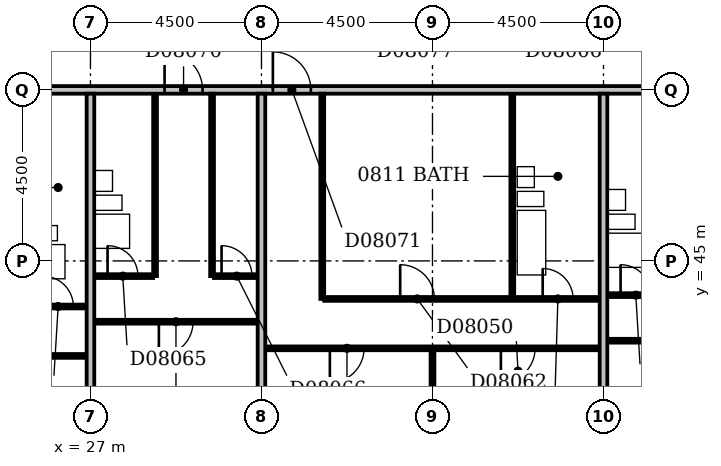
"""IFC4 building model, lengths in metres.
Left out: names, types, materials, properties, quantities, classifications, styles, units other than length and angle.
Written with IfcOpenShell. Run it as: python <this file> out.ifc"""

import sys

from ifc_helpers import new_model, si_unit, direction, frame, frame_2d, origin, place, context, subcontext, project, spatial, rectangle, extrude, element, fill, save


model = new_model("IFC4")
c1 = context("Model", 3, precision=1e-05, world=origin(), true_north=direction((0.0, 1.0)))
c2 = subcontext(c1, "Body", "Model", "MODEL_VIEW")
j1 = project(units=[si_unit("LENGTHUNIT", "METRE"), si_unit("PLANEANGLEUNIT", "RADIAN")], contexts=[c1])
p1 = place(None, origin())
s1 = spatial("IfcSite", under=j1, at=p1, CompositionType="ELEMENT")
p2 = place(p1, origin())
s2 = spatial("IfcBuilding", under=s1, at=p2, CompositionType="ELEMENT")
p3 = place(p2, frame((0.0, 0.0, 39.8)))
s3 = spatial("IfcBuildingStorey", under=s2, at=p3, CompositionType="ELEMENT", Elevation=39.8)
p4 = place(p3, frame((27.0, 36.6, 0.0), z_axis=(0.0, 0.0, 1.0), x_axis=(0.0, 1.0, 0.0)))
e1 = element("IfcWall", 1, at=p4, inside=s3, PredefinedType="PARTITIONING", context=c2, shape_type="SweptSolid", body=[
    extrude(rectangle(XDim=12.8, YDim=0.2, at=frame_2d((6.4, 0.0))), origin(), (0.0, 0.0, 1.0), 2.6),
])
p5 = place(p3, frame((31.5, 36.6, 0.0), z_axis=(0.0, 0.0, 1.0), x_axis=(0.0, 1.0, 0.0)))
e2 = element("IfcWall", 2, at=p5, inside=s3, PredefinedType="PARTITIONING", context=c2, shape_type="SweptSolid", body=[
    extrude(rectangle(XDim=12.8, YDim=0.2, at=frame_2d((6.4, 0.0))), origin(), (0.0, 0.0, 1.0), 3.3),
])
p6 = place(p3, frame((36.0, 36.6, 0.0), z_axis=(0.0, 0.0, 1.0), x_axis=(0.0, 1.0, 0.0)))
e3 = element("IfcWall", 3, at=p6, inside=s3, PredefinedType="PARTITIONING", context=c2, shape_type="SweptSolid", body=[
    extrude(rectangle(XDim=6.05, YDim=0.1, at=frame_2d((3.025, 0.0))), origin(), (0.0, 0.0, 1.0), 2.4),
])
p7 = place(p3, frame((40.5, 36.6, 0.0), z_axis=(0.0, 0.0, 1.0), x_axis=(0.0, 1.0, 0.0)))
e4 = element("IfcWall", 4, at=p7, inside=s3, PredefinedType="PARTITIONING", context=c2, shape_type="SweptSolid", body=[
    extrude(rectangle(XDim=12.8, YDim=0.2, at=frame_2d((6.4, 0.0))), origin(), (0.0, 0.0, 1.0), 3.3),
])
p8 = place(p3, frame((22.6, 42.5, 0.0), z_axis=(0.0, 0.0, 1.0), x_axis=(1.0, 0.0, 0.0)))
e5 = element("IfcWall", 5, at=p8, inside=s3, PredefinedType="PARTITIONING", context=c2, shape_type="SweptSolid", body=[
    extrude(rectangle(XDim=4.3, YDim=0.1, at=frame_2d((2.15, 0.0))), origin(), (0.0, 0.0, 1.0), 3.3),
])
p9 = place(p8, frame((1.7, 0.0, 0.0)))
e6 = element("IfcOpeningElement", 6, at=p9, cuts=e5, PredefinedType="OPENING", context=c2, shape_type="SweptSolid", body=[
    extrude(rectangle(XDim=0.9, YDim=2.1, at=frame_2d((0.45, 1.05))), frame((0.0, 0.062, 0.0), z_axis=(0.0, -1.0, 0.0), x_axis=(1.0, 0.0, 0.0)), (0.0, 0.0, 1.0), 0.124),
])
p10 = place(p3, frame((31.6, 42.7, 0.0), z_axis=(0.0, 0.0, 1.0), x_axis=(1.0, 0.0, 0.0)))
e7 = element("IfcWall", 7, at=p10, inside=s3, PredefinedType="PARTITIONING", context=c2, shape_type="SweptSolid", body=[
    extrude(rectangle(XDim=8.8, YDim=0.1, at=frame_2d((4.4, 0.0))), origin(), (0.0, 0.0, 1.0), 3.3),
])
p11 = place(p10, frame((1.7, 0.0, 0.0)))
e8 = element("IfcOpeningElement", 8, at=p11, cuts=e7, PredefinedType="OPENING", context=c2, shape_type="SweptSolid", body=[
    extrude(rectangle(XDim=0.9, YDim=2.1, at=frame_2d((0.45, 1.05))), frame((0.0, 0.062, 0.0), z_axis=(0.0, -1.0, 0.0), x_axis=(1.0, 0.0, 0.0)), (0.0, 0.0, 1.0), 0.124),
])
p12 = place(p10, frame((6.2, 0.0, 0.0)))
e9 = element("IfcOpeningElement", 9, at=p12, cuts=e7, PredefinedType="OPENING", context=c2, shape_type="SweptSolid", body=[
    extrude(rectangle(XDim=0.9, YDim=2.1, at=frame_2d((0.45, 1.05))), frame((0.0, 0.062, 0.0), z_axis=(0.0, -1.0, 0.0), x_axis=(1.0, 0.0, 0.0)), (0.0, 0.0, 1.0), 0.124),
])
p13 = place(p3, frame((40.6, 42.9, 0.0), z_axis=(0.0, 0.0, 1.0), x_axis=(1.0, 0.0, 0.0)))
e10 = element("IfcWall", 10, at=p13, inside=s3, PredefinedType="PARTITIONING", context=c2, shape_type="SweptSolid", body=[
    extrude(rectangle(XDim=4.3, YDim=0.1, at=frame_2d((2.15, 0.0))), origin(), (0.0, 0.0, 1.0), 3.3),
])
p14 = place(p13, frame((1.7, 0.0, 0.0)))
e11 = element("IfcOpeningElement", 11, at=p14, cuts=e10, PredefinedType="OPENING", context=c2, shape_type="SweptSolid", body=[
    extrude(rectangle(XDim=0.9, YDim=2.1, at=frame_2d((0.45, 1.05))), frame((0.0, 0.062, 0.0), z_axis=(0.0, -1.0, 0.0), x_axis=(1.0, 0.0, 0.0)), (0.0, 0.0, 1.0), 0.124),
])
p15 = place(p3, frame((27.1, 43.4, 0.0), z_axis=(0.0, 0.0, 1.0), x_axis=(1.0, 0.0, 0.0)))
e12 = element("IfcWall", 12, at=p15, inside=s3, PredefinedType="PARTITIONING", context=c2, shape_type="SweptSolid", body=[
    extrude(rectangle(XDim=4.3, YDim=0.1, at=frame_2d((2.15, 0.0))), origin(), (0.0, 0.0, 1.0), 3.3),
])
p16 = place(p15, frame((1.7, 0.0, 0.0)))
e13 = element("IfcOpeningElement", 13, at=p16, cuts=e12, PredefinedType="OPENING", context=c2, shape_type="SweptSolid", body=[
    extrude(rectangle(XDim=0.9, YDim=2.1, at=frame_2d((0.45, 1.05))), frame((0.0, 0.062, 0.0), z_axis=(0.0, -1.0, 0.0), x_axis=(1.0, 0.0, 0.0)), (0.0, 0.0, 1.0), 0.124),
])
p17 = place(p3, frame((25.35, 43.8, 0.0), z_axis=(0.0, 0.0, 1.0), x_axis=(1.0, 0.0, 0.0)))
e14 = element("IfcWall", 14, at=p17, inside=s3, PredefinedType="PARTITIONING", context=c2, shape_type="SweptSolid", body=[
    extrude(rectangle(XDim=1.55, YDim=0.1, at=frame_2d((0.775, 0.0))), origin(), (0.0, 0.0, 1.0), 3.3),
])
p18 = place(p17, frame((0.4, 0.0, 0.0)))
e15 = element("IfcOpeningElement", 15, at=p18, cuts=e14, PredefinedType="OPENING", context=c2, shape_type="SweptSolid", body=[
    extrude(rectangle(XDim=0.8, YDim=2.1, at=frame_2d((0.4, 1.05))), frame((0.0, 0.062, 0.0), z_axis=(0.0, -1.0, 0.0), x_axis=(1.0, 0.0, 0.0)), (0.0, 0.0, 1.0), 0.124),
])
p19 = place(p3, frame((33.1, 44.0, 0.0), z_axis=(0.0, 0.0, 1.0), x_axis=(0.0, 1.0, 0.0)))
e16 = element("IfcWall", 16, at=p19, inside=s3, PredefinedType="PARTITIONING", context=c2, shape_type="SweptSolid", body=[
    extrude(rectangle(XDim=5.4, YDim=0.1, at=frame_2d((2.7, 0.0))), origin(), (0.0, 0.0, 1.0), 3.3),
])
p20 = place(p3, frame((33.15, 44.0, 0.0), z_axis=(0.0, 0.0, 1.0), x_axis=(1.0, 0.0, 0.0)))
e17 = element("IfcWall", 17, at=p20, inside=s3, PredefinedType="PARTITIONING", context=c2, shape_type="SweptSolid", body=[
    extrude(rectangle(XDim=7.25, YDim=0.1, at=frame_2d((3.625, 0.0))), origin(), (0.0, 0.0, 1.0), 3.3),
])
p21 = place(p20, frame((5.75, 0.0, 0.0)))
e18 = element("IfcOpeningElement", 18, at=p21, cuts=e17, PredefinedType="OPENING", context=c2, shape_type="SweptSolid", body=[
    extrude(rectangle(XDim=0.8, YDim=2.1, at=frame_2d((0.4, 1.05))), frame((0.0, 0.062, 0.0), z_axis=(0.0, -1.0, 0.0), x_axis=(1.0, 0.0, 0.0)), (0.0, 0.0, 1.0), 0.124),
])
p22 = place(p20, frame((2.0, 0.0, 0.0)))
e19 = element("IfcOpeningElement", 19, at=p22, cuts=e17, PredefinedType="OPENING", context=c2, shape_type="SweptSolid", body=[
    extrude(rectangle(XDim=0.9, YDim=2.1, at=frame_2d((0.45, 1.05))), frame((0.0, 0.062, 0.0), z_axis=(0.0, -1.0, 0.0), x_axis=(1.0, 0.0, 0.0)), (0.0, 0.0, 1.0), 0.124),
])
p23 = place(p3, frame((38.1, 44.05, 0.0), z_axis=(0.0, 0.0, 1.0), x_axis=(0.0, 1.0, 0.0)))
e20 = element("IfcWall", 20, at=p23, inside=s3, PredefinedType="PLUMBINGWALL", context=c2, shape_type="SweptSolid", body=[
    extrude(rectangle(XDim=5.35, YDim=0.1, at=frame_2d((2.675, 0.0))), origin(), (0.0, 0.0, 1.0), 3.3),
])
p24 = place(p3, frame((40.6, 44.1, 0.0), z_axis=(0.0, 0.0, 1.0), x_axis=(1.0, 0.0, 0.0)))
e21 = element("IfcWall", 21, at=p24, inside=s3, PredefinedType="PARTITIONING", context=c2, shape_type="SweptSolid", body=[
    extrude(rectangle(XDim=1.55, YDim=0.1, at=frame_2d((0.775, 0.0))), origin(), (0.0, 0.0, 1.0), 3.3),
])
p25 = place(p24, frame((0.35, 0.0, 0.0)))
e22 = element("IfcOpeningElement", 22, at=p25, cuts=e21, PredefinedType="OPENING", context=c2, shape_type="SweptSolid", body=[
    extrude(rectangle(XDim=0.8, YDim=2.1, at=frame_2d((0.4, 1.05))), frame((0.0, 0.062, 0.0), z_axis=(0.0, -1.0, 0.0), x_axis=(1.0, 0.0, 0.0)), (0.0, 0.0, 1.0), 0.124),
])
p26 = place(p3, frame((27.1, 44.6, 0.0), z_axis=(0.0, 0.0, 1.0), x_axis=(1.0, 0.0, 0.0)))
e23 = element("IfcWall", 23, at=p26, inside=s3, PredefinedType="PARTITIONING", context=c2, shape_type="SweptSolid", body=[
    extrude(rectangle(XDim=1.55, YDim=0.1, at=frame_2d((0.775, 0.0))), origin(), (0.0, 0.0, 1.0), 3.3),
])
p27 = place(p26, frame((0.35, 0.0, 0.0)))
e24 = element("IfcOpeningElement", 24, at=p27, cuts=e23, PredefinedType="OPENING", context=c2, shape_type="SweptSolid", body=[
    extrude(rectangle(XDim=0.8, YDim=2.1, at=frame_2d((0.4, 1.05))), frame((0.0, 0.062, 0.0), z_axis=(0.0, -1.0, 0.0), x_axis=(1.0, 0.0, 0.0)), (0.0, 0.0, 1.0), 0.124),
])
p28 = place(p3, frame((28.7, 44.6, 0.0), z_axis=(0.0, 0.0, 1.0), x_axis=(0.0, 1.0, 0.0)))
e25 = element("IfcWall", 25, at=p28, inside=s3, PredefinedType="PLUMBINGWALL", context=c2, shape_type="SweptSolid", body=[
    extrude(rectangle(XDim=4.8, YDim=0.1, at=frame_2d((2.4, 0.0))), origin(), (0.0, 0.0, 1.0), 3.3),
])
p29 = place(p3, frame((30.2, 44.6, 0.0), z_axis=(0.0, 0.0, 1.0), x_axis=(0.0, 1.0, 0.0)))
e26 = element("IfcWall", 26, at=p29, inside=s3, PredefinedType="PARTITIONING", context=c2, shape_type="SweptSolid", body=[
    extrude(rectangle(XDim=4.8, YDim=0.1, at=frame_2d((2.4, 0.0))), origin(), (0.0, 0.0, 1.0), 3.3),
])
p30 = place(p3, frame((30.25, 44.6, 0.0), z_axis=(0.0, 0.0, 1.0), x_axis=(1.0, 0.0, 0.0)))
e27 = element("IfcWall", 27, at=p30, inside=s3, PredefinedType="PARTITIONING", context=c2, shape_type="SweptSolid", body=[
    extrude(rectangle(XDim=1.15, YDim=0.1, at=frame_2d((0.575, 0.0))), origin(), (0.0, 0.0, 1.0), 3.3),
])
p31 = place(p30, frame((0.2, 0.0, 0.0)))
e28 = element("IfcOpeningElement", 28, at=p31, cuts=e27, PredefinedType="OPENING", context=c2, shape_type="SweptSolid", body=[
    extrude(rectangle(XDim=0.8, YDim=2.1, at=frame_2d((0.4, 1.05))), frame((0.0, 0.062, 0.0), z_axis=(0.0, -1.0, 0.0), x_axis=(1.0, 0.0, 0.0)), (0.0, 0.0, 1.0), 0.124),
])
p32 = place(p3, frame((9.1, 49.5, 0.0), z_axis=(0.0, 0.0, 1.0), x_axis=(1.0, 0.0, 0.0)))
e29 = element("IfcWall", 29, at=p32, inside=s3, PredefinedType="PARTITIONING", context=c2, shape_type="SweptSolid", body=[
    extrude(rectangle(XDim=57.8, YDim=0.2, at=frame_2d((28.9, 0.0))), origin(), (0.0, 0.0, 1.0), 3.3),
])
p33 = place(p32, frame((14.95, 0.0, 0.0)))
e30 = element("IfcOpeningElement", 30, at=p33, cuts=e29, PredefinedType="OPENING", context=c2, shape_type="SweptSolid", body=[
    extrude(rectangle(XDim=1.0, YDim=2.1, at=frame_2d((0.5, 1.05))), frame((0.0, 0.112, 0.0), z_axis=(0.0, -1.0, 0.0), x_axis=(1.0, 0.0, 0.0)), (0.0, 0.0, 1.0), 0.224),
])
p34 = place(p32, frame((19.85, 0.0, 0.0)))
e31 = element("IfcOpeningElement", 31, at=p34, cuts=e29, PredefinedType="OPENING", context=c2, shape_type="SweptSolid", body=[
    extrude(rectangle(XDim=1.0, YDim=2.1, at=frame_2d((0.5, 1.05))), frame((0.0, 0.112, 0.0), z_axis=(0.0, -1.0, 0.0), x_axis=(1.0, 0.0, 0.0)), (0.0, 0.0, 1.0), 0.224),
])
p35 = place(p32, frame((22.7, 0.0, 0.0)))
e32 = element("IfcOpeningElement", 32, at=p35, cuts=e29, PredefinedType="OPENING", context=c2, shape_type="SweptSolid", body=[
    extrude(rectangle(XDim=1.0, YDim=2.1, at=frame_2d((0.5, 1.05))), frame((0.0, 0.112, 0.0), z_axis=(0.0, -1.0, 0.0), x_axis=(1.0, 0.0, 0.0)), (0.0, 0.0, 1.0), 0.224),
])
p36 = place(p32, frame((33.35, 0.0, 0.0)))
e33 = element("IfcOpeningElement", 33, at=p36, cuts=e29, PredefinedType="OPENING", context=c2, shape_type="SweptSolid", body=[
    extrude(rectangle(XDim=1.0, YDim=2.1, at=frame_2d((0.5, 1.05))), frame((0.0, 0.112, 0.0), z_axis=(0.0, -1.0, 0.0), x_axis=(1.0, 0.0, 0.0)), (0.0, 0.0, 1.0), 0.224),
])
p37 = place(p32, frame((36.2, 0.0, 0.0)))
e34 = element("IfcOpeningElement", 34, at=p37, cuts=e29, PredefinedType="OPENING", context=c2, shape_type="SweptSolid", body=[
    extrude(rectangle(XDim=1.0, YDim=2.1, at=frame_2d((0.5, 1.05))), frame((0.0, 0.112, 0.0), z_axis=(0.0, -1.0, 0.0), x_axis=(1.0, 0.0, 0.0)), (0.0, 0.0, 1.0), 0.224),
])
p38 = place(p32, frame((54.15, 0.0, 0.0)))
e35 = element("IfcOpeningElement", 35, at=p38, cuts=e29, PredefinedType="OPENING", context=c2, shape_type="SweptSolid", body=[
    extrude(rectangle(XDim=1.0, YDim=2.1, at=frame_2d((0.5, 1.05))), frame((0.0, 0.112, 0.0), z_axis=(0.0, -1.0, 0.0), x_axis=(1.0, 0.0, 0.0)), (0.0, 0.0, 1.0), 0.224),
])
p39 = place(p32, frame((6.15, 0.0, 0.0)))
e36 = element("IfcOpeningElement", 36, at=p39, cuts=e29, PredefinedType="OPENING", context=c2, shape_type="SweptSolid", body=[
    extrude(rectangle(XDim=0.9, YDim=2.1, at=frame_2d((0.45, 1.05))), frame((0.0, 0.112, 0.0), z_axis=(0.0, -1.0, 0.0), x_axis=(1.0, 0.0, 0.0)), (0.0, 0.0, 1.0), 0.224),
])
p40 = place(p11, frame((0.9, 0.0, 0.0), z_axis=(0.0, 0.0, 1.0), x_axis=(-1.0, 0.0, 0.0)))
e37 = element("IfcDoor", 37, at=p40, inside=s3, OperationType="SINGLE_SWING_RIGHT", PredefinedType="DOOR", context=c2, shape_type="SweptSolid", body=[
    extrude(rectangle(XDim=0.9, YDim=2.1, at=frame_2d((0.45, 1.05))), frame((0.0, 0.025, 0.0), z_axis=(0.0, -1.0, 0.0), x_axis=(1.0, 0.0, 0.0)), (0.0, 0.0, 1.0), 0.05),
])
fill(e8, e37)
p41 = place(p12, frame((0.9, 0.0, 0.0), z_axis=(0.0, 0.0, 1.0), x_axis=(-1.0, 0.0, 0.0)))
e38 = element("IfcDoor", 38, at=p41, inside=s3, OperationType="SINGLE_SWING_RIGHT", PredefinedType="DOOR", context=c2, shape_type="SweptSolid", body=[
    extrude(rectangle(XDim=0.9, YDim=2.1, at=frame_2d((0.45, 1.05))), frame((0.0, 0.025, 0.0), z_axis=(0.0, -1.0, 0.0), x_axis=(1.0, 0.0, 0.0)), (0.0, 0.0, 1.0), 0.05),
])
fill(e9, e38)
p42 = place(p16, frame((0.9, 0.0, 0.0), z_axis=(0.0, 0.0, 1.0), x_axis=(-1.0, 0.0, 0.0)))
e39 = element("IfcDoor", 39, at=p42, inside=s3, OperationType="SINGLE_SWING_RIGHT", PredefinedType="DOOR", context=c2, shape_type="SweptSolid", body=[
    extrude(rectangle(XDim=0.9, YDim=2.1, at=frame_2d((0.45, 1.05))), frame((0.0, 0.025, 0.0), z_axis=(0.0, -1.0, 0.0), x_axis=(1.0, 0.0, 0.0)), (0.0, 0.0, 1.0), 0.05),
])
fill(e13, e39)
p43 = place(p18, origin())
e40 = element("IfcDoor", 40, at=p43, inside=s3, OperationType="SINGLE_SWING_LEFT", PredefinedType="DOOR", context=c2, shape_type="SweptSolid", body=[
    extrude(rectangle(XDim=0.8, YDim=2.1, at=frame_2d((0.4, 1.05))), frame((0.0, 0.025, 0.0), z_axis=(0.0, -1.0, 0.0), x_axis=(1.0, 0.0, 0.0)), (0.0, 0.0, 1.0), 0.05),
])
fill(e15, e40)
p44 = place(p21, origin())
e41 = element("IfcDoor", 41, at=p44, inside=s3, OperationType="SINGLE_SWING_LEFT", PredefinedType="DOOR", context=c2, shape_type="SweptSolid", body=[
    extrude(rectangle(XDim=0.8, YDim=2.1, at=frame_2d((0.4, 1.05))), frame((0.0, 0.025, 0.0), z_axis=(0.0, -1.0, 0.0), x_axis=(1.0, 0.0, 0.0)), (0.0, 0.0, 1.0), 0.05),
])
fill(e18, e41)
p45 = place(p22, origin())
e42 = element("IfcDoor", 42, at=p45, inside=s3, OperationType="SINGLE_SWING_LEFT", PredefinedType="DOOR", context=c2, shape_type="SweptSolid", body=[
    extrude(rectangle(XDim=0.9, YDim=2.1, at=frame_2d((0.45, 1.05))), frame((0.0, 0.025, 0.0), z_axis=(0.0, -1.0, 0.0), x_axis=(1.0, 0.0, 0.0)), (0.0, 0.0, 1.0), 0.05),
])
fill(e19, e42)
p46 = place(p25, origin())
e43 = element("IfcDoor", 43, at=p46, inside=s3, OperationType="SINGLE_SWING_LEFT", PredefinedType="DOOR", context=c2, shape_type="SweptSolid", body=[
    extrude(rectangle(XDim=0.8, YDim=2.1, at=frame_2d((0.4, 1.05))), frame((0.0, 0.025, 0.0), z_axis=(0.0, -1.0, 0.0), x_axis=(1.0, 0.0, 0.0)), (0.0, 0.0, 1.0), 0.05),
])
fill(e22, e43)
p47 = place(p27, origin())
e44 = element("IfcDoor", 44, at=p47, inside=s3, OperationType="SINGLE_SWING_LEFT", PredefinedType="DOOR", context=c2, shape_type="SweptSolid", body=[
    extrude(rectangle(XDim=0.8, YDim=2.1, at=frame_2d((0.4, 1.05))), frame((0.0, 0.025, 0.0), z_axis=(0.0, -1.0, 0.0), x_axis=(1.0, 0.0, 0.0)), (0.0, 0.0, 1.0), 0.05),
])
fill(e24, e44)
p48 = place(p31, origin())
e45 = element("IfcDoor", 45, at=p48, inside=s3, OperationType="SINGLE_SWING_LEFT", PredefinedType="DOOR", context=c2, shape_type="SweptSolid", body=[
    extrude(rectangle(XDim=0.8, YDim=2.1, at=frame_2d((0.4, 1.05))), frame((0.0, 0.025, 0.0), z_axis=(0.0, -1.0, 0.0), x_axis=(1.0, 0.0, 0.0)), (0.0, 0.0, 1.0), 0.05),
])
fill(e28, e45)
p49 = place(p34, origin())
e46 = element("IfcDoor", 46, at=p49, inside=s3, OperationType="SINGLE_SWING_LEFT", PredefinedType="DOOR", context=c2, shape_type="SweptSolid", body=[
    extrude(rectangle(XDim=1.0, YDim=2.1, at=frame_2d((0.5, 1.05))), frame((0.0, 0.025, 0.0), z_axis=(0.0, -1.0, 0.0), x_axis=(1.0, 0.0, 0.0)), (0.0, 0.0, 1.0), 0.05),
])
fill(e31, e46)
p50 = place(p35, origin())
e47 = element("IfcDoor", 47, at=p50, inside=s3, OperationType="SINGLE_SWING_LEFT", PredefinedType="DOOR", context=c2, shape_type="SweptSolid", body=[
    extrude(rectangle(XDim=1.0, YDim=2.1, at=frame_2d((0.5, 1.05))), frame((0.0, 0.025, 0.0), z_axis=(0.0, -1.0, 0.0), x_axis=(1.0, 0.0, 0.0)), (0.0, 0.0, 1.0), 0.05),
])
fill(e32, e47)
save(model, sys.argv[1])
